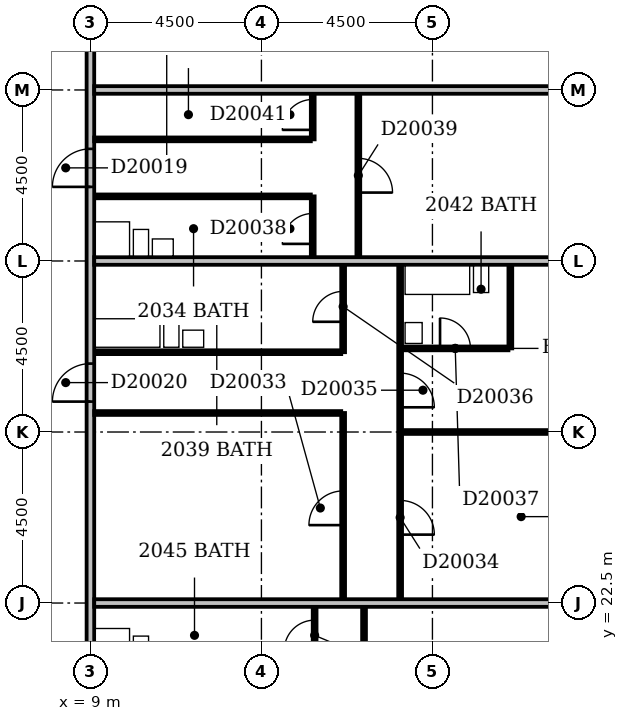
"""IFC4 building model, lengths in metres.
Left out: names, types, materials, properties, quantities, classifications, styles, units other than length and angle.
Written with IfcOpenShell. Run it as: python <this file> out.ifc"""

import sys

from ifc_helpers import new_model, si_unit, direction, frame, frame_2d, origin, place, context, subcontext, project, spatial, rectangle, extrude, element, fill, save


model = new_model("IFC4")
c1 = context("Model", 3, precision=1e-05, world=origin(), true_north=direction((0.0, 1.0)))
c2 = subcontext(c1, "Body", "Model", "MODEL_VIEW")
j1 = project(units=[si_unit("LENGTHUNIT", "METRE"), si_unit("PLANEANGLEUNIT", "RADIAN")], contexts=[c1])
p1 = place(None, origin())
s1 = spatial("IfcSite", under=j1, at=p1, CompositionType="ELEMENT")
p2 = place(p1, origin())
s2 = spatial("IfcBuilding", under=s1, at=p2, CompositionType="ELEMENT")
p3 = place(p2, frame((0.0, 0.0, 83.0)))
s3 = spatial("IfcBuildingStorey", under=s2, at=p3, CompositionType="ELEMENT", Elevation=83.0)
p4 = place(p3, frame((9.0, 5.0, 0.0), z_axis=(0.0, 0.0, 1.0), x_axis=(0.0, 1.0, 0.0)))
e1 = element("IfcWall", 1, at=p4, inside=s3, PredefinedType="PARTITIONING", context=c2, shape_type="SweptSolid", body=[
    extrude(rectangle(XDim=44.5, YDim=0.2, at=frame_2d((22.25, 0.0))), origin(), (0.0, 0.0, 1.0), 3.3),
])
p5 = place(p4, frame((28.45, 0.0, 0.0)))
e2 = element("IfcOpeningElement", 2, at=p5, cuts=e1, PredefinedType="OPENING", context=c2, shape_type="SweptSolid", body=[
    extrude(rectangle(XDim=1.0, YDim=2.1, at=frame_2d((0.5, 1.05))), frame((0.0, 0.112, 0.0), z_axis=(0.0, -1.0, 0.0), x_axis=(1.0, 0.0, 0.0)), (0.0, 0.0, 1.0), 0.224),
])
p6 = place(p4, frame((22.8, 0.0, 0.0)))
e3 = element("IfcOpeningElement", 3, at=p6, cuts=e1, PredefinedType="OPENING", context=c2, shape_type="SweptSolid", body=[
    extrude(rectangle(XDim=1.0, YDim=2.1, at=frame_2d((0.5, 1.05))), frame((0.0, 0.112, 0.0), z_axis=(0.0, -1.0, 0.0), x_axis=(1.0, 0.0, 0.0)), (0.0, 0.0, 1.0), 0.224),
])
p7 = place(p4, frame((14.55, 0.0, 0.0)))
e4 = element("IfcOpeningElement", 4, at=p7, cuts=e1, PredefinedType="OPENING", context=c2, shape_type="SweptSolid", body=[
    extrude(rectangle(XDim=1.0, YDim=2.1, at=frame_2d((0.5, 1.05))), frame((0.0, 0.112, 0.0), z_axis=(0.0, -1.0, 0.0), x_axis=(1.0, 0.0, 0.0)), (0.0, 0.0, 1.0), 0.224),
])
p8 = place(p4, frame((9.3, 0.0, 0.0)))
e5 = element("IfcOpeningElement", 5, at=p8, cuts=e1, PredefinedType="OPENING", context=c2, shape_type="SweptSolid", body=[
    extrude(rectangle(XDim=1.0, YDim=2.1, at=frame_2d((0.5, 1.05))), frame((0.0, 0.112, 0.0), z_axis=(0.0, -1.0, 0.0), x_axis=(1.0, 0.0, 0.0)), (0.0, 0.0, 1.0), 0.224),
])
p9 = place(p4, frame((35.0, 0.0, 0.0)))
e6 = element("IfcOpeningElement", 6, at=p9, cuts=e1, PredefinedType="OPENING", context=c2, shape_type="SweptSolid", body=[
    extrude(rectangle(XDim=0.9, YDim=2.1, at=frame_2d((0.45, 1.05))), frame((0.0, 0.112, 0.0), z_axis=(0.0, -1.0, 0.0), x_axis=(1.0, 0.0, 0.0)), (0.0, 0.0, 1.0), 0.224),
])
p10 = place(p4, frame((1.5, 0.0, 0.0)))
e7 = element("IfcOpeningElement", 7, at=p10, cuts=e1, PredefinedType="OPENING", context=c2, shape_type="SweptSolid", body=[
    extrude(rectangle(XDim=0.9, YDim=2.1, at=frame_2d((0.45, 1.05))), frame((0.0, 0.112, 0.0), z_axis=(0.0, -1.0, 0.0), x_axis=(1.0, 0.0, 0.0)), (0.0, 0.0, 1.0), 0.224),
])
p11 = place(p3, frame((16.2, 18.1, 0.0), z_axis=(0.0, 0.0, 1.0), x_axis=(0.0, 1.0, 0.0)))
e8 = element("IfcWall", 8, at=p11, inside=s3, PredefinedType="PARTITIONING", context=c2, shape_type="SweptSolid", body=[
    extrude(rectangle(XDim=4.3, YDim=0.1, at=frame_2d((2.15, 0.0))), origin(), (0.0, 0.0, 1.0), 3.3),
])
p12 = place(p11, frame((1.7, 0.0, 0.0)))
e9 = element("IfcOpeningElement", 9, at=p12, cuts=e8, PredefinedType="OPENING", context=c2, shape_type="SweptSolid", body=[
    extrude(rectangle(XDim=0.9, YDim=2.1, at=frame_2d((0.45, 1.05))), frame((0.0, 0.062, 0.0), z_axis=(0.0, -1.0, 0.0), x_axis=(1.0, 0.0, 0.0)), (0.0, 0.0, 1.0), 0.124),
])
p13 = place(p3, frame((14.9, 20.8, 0.0), z_axis=(0.0, 0.0, 1.0), x_axis=(0.0, 1.0, 0.0)))
e10 = element("IfcWall", 10, at=p13, inside=s3, PredefinedType="PARTITIONING", context=c2, shape_type="SweptSolid", body=[
    extrude(rectangle(XDim=1.6, YDim=0.1, at=frame_2d((0.8, 0.0))), origin(), (0.0, 0.0, 1.0), 3.3),
])
p14 = place(p13, frame((0.45, 0.0, 0.0)))
e11 = element("IfcOpeningElement", 11, at=p14, cuts=e10, PredefinedType="OPENING", context=c2, shape_type="SweptSolid", body=[
    extrude(rectangle(XDim=0.8, YDim=2.1, at=frame_2d((0.4, 1.05))), frame((0.0, 0.062, 0.0), z_axis=(0.0, -1.0, 0.0), x_axis=(1.0, 0.0, 0.0)), (0.0, 0.0, 1.0), 0.124),
])
p15 = place(p3, frame((9.1, 22.5, 0.0), z_axis=(0.0, 0.0, 1.0), x_axis=(1.0, 0.0, 0.0)))
e12 = element("IfcWall", 12, at=p15, inside=s3, PredefinedType="PARTITIONING", context=c2, shape_type="SweptSolid", body=[
    extrude(rectangle(XDim=12.8, YDim=0.2, at=frame_2d((6.4, 0.0))), origin(), (0.0, 0.0, 1.0), 3.3),
])
p16 = place(p3, frame((15.65, 22.6, 0.0), z_axis=(0.0, 0.0, 1.0), x_axis=(0.0, 1.0, 0.0)))
e13 = element("IfcWall", 13, at=p16, inside=s3, PredefinedType="PARTITIONING", context=c2, shape_type="SweptSolid", body=[
    extrude(rectangle(XDim=4.9, YDim=0.1, at=frame_2d((2.45, 0.0))), origin(), (0.0, 0.0, 1.0), 3.3),
])
p17 = place(p16, frame((1.95, 0.0, 0.0)))
e14 = element("IfcOpeningElement", 14, at=p17, cuts=e13, PredefinedType="OPENING", context=c2, shape_type="SweptSolid", body=[
    extrude(rectangle(XDim=0.9, YDim=2.1, at=frame_2d((0.45, 1.05))), frame((0.0, 0.062, 0.0), z_axis=(0.0, -1.0, 0.0), x_axis=(1.0, 0.0, 0.0)), (0.0, 0.0, 1.0), 0.124),
])
p18 = place(p3, frame((17.15, 22.6, 0.0), z_axis=(0.0, 0.0, 1.0), x_axis=(0.0, 1.0, 0.0)))
e15 = element("IfcWall", 15, at=p18, inside=s3, PredefinedType="PARTITIONING", context=c2, shape_type="SweptSolid", body=[
    extrude(rectangle(XDim=8.8, YDim=0.1, at=frame_2d((4.4, 0.0))), origin(), (0.0, 0.0, 1.0), 3.3),
])
p19 = place(p18, frame((1.7, 0.0, 0.0)))
e16 = element("IfcOpeningElement", 16, at=p19, cuts=e15, PredefinedType="OPENING", context=c2, shape_type="SweptSolid", body=[
    extrude(rectangle(XDim=0.9, YDim=2.1, at=frame_2d((0.45, 1.05))), frame((0.0, 0.062, 0.0), z_axis=(0.0, -1.0, 0.0), x_axis=(1.0, 0.0, 0.0)), (0.0, 0.0, 1.0), 0.124),
])
p20 = place(p18, frame((5.05, 0.0, 0.0)))
e17 = element("IfcOpeningElement", 17, at=p20, cuts=e15, PredefinedType="OPENING", context=c2, shape_type="SweptSolid", body=[
    extrude(rectangle(XDim=0.9, YDim=2.1, at=frame_2d((0.45, 1.05))), frame((0.0, 0.062, 0.0), z_axis=(0.0, -1.0, 0.0), x_axis=(1.0, 0.0, 0.0)), (0.0, 0.0, 1.0), 0.124),
])
p21 = place(p3, frame((17.2, 27.0, 0.0), z_axis=(0.0, 0.0, 1.0), x_axis=(1.0, 0.0, 0.0)))
e18 = element("IfcWall", 18, at=p21, inside=s3, PredefinedType="PARTITIONING", context=c2, shape_type="SweptSolid", body=[
    extrude(rectangle(XDim=4.7, YDim=0.1, at=frame_2d((2.35, 0.0))), origin(), (0.0, 0.0, 1.0), 2.7),
])
p22 = place(p3, frame((9.1, 27.5, 0.0), z_axis=(0.0, 0.0, 1.0), x_axis=(1.0, 0.0, 0.0)))
e19 = element("IfcWall", 19, at=p22, inside=s3, PredefinedType="PARTITIONING", context=c2, shape_type="SweptSolid", body=[
    extrude(rectangle(XDim=6.5, YDim=0.1, at=frame_2d((3.25, 0.0))), origin(), (0.0, 0.0, 1.0), 2.7),
])
p23 = place(p3, frame((9.1, 29.1, 0.0), z_axis=(0.0, 0.0, 1.0), x_axis=(1.0, 0.0, 0.0)))
e20 = element("IfcWall", 20, at=p23, inside=s3, PredefinedType="PLUMBINGWALL", context=c2, shape_type="SweptSolid", body=[
    extrude(rectangle(XDim=6.5, YDim=0.1, at=frame_2d((3.25, 0.0))), origin(), (0.0, 0.0, 1.0), 3.3),
])
p24 = place(p3, frame((15.65, 29.1, 0.0), z_axis=(0.0, 0.0, 1.0), x_axis=(0.0, 1.0, 0.0)))
e21 = element("IfcWall", 21, at=p24, inside=s3, PredefinedType="PARTITIONING", context=c2, shape_type="SweptSolid", body=[
    extrude(rectangle(XDim=2.3, YDim=0.1, at=frame_2d((1.15, 0.0))), origin(), (0.0, 0.0, 1.0), 3.3),
])
p25 = place(p24, frame((0.8, 0.0, 0.0)))
e22 = element("IfcOpeningElement", 22, at=p25, cuts=e21, PredefinedType="OPENING", context=c2, shape_type="SweptSolid", body=[
    extrude(rectangle(XDim=0.8, YDim=2.1, at=frame_2d((0.4, 1.05))), frame((0.0, 0.062, 0.0), z_axis=(0.0, -1.0, 0.0), x_axis=(1.0, 0.0, 0.0)), (0.0, 0.0, 1.0), 0.124),
])
p26 = place(p3, frame((17.2, 29.2, 0.0), z_axis=(0.0, 0.0, 1.0), x_axis=(1.0, 0.0, 0.0)))
e23 = element("IfcWall", 23, at=p26, inside=s3, PredefinedType="PLUMBINGWALL", context=c2, shape_type="SweptSolid", body=[
    extrude(rectangle(XDim=2.8, YDim=0.1, at=frame_2d((1.4, 0.0))), origin(), (0.0, 0.0, 1.0), 3.3),
])
p27 = place(p26, frame((1.0, 0.0, 0.0)))
e24 = element("IfcOpeningElement", 24, at=p27, cuts=e23, PredefinedType="OPENING", context=c2, shape_type="SweptSolid", body=[
    extrude(rectangle(XDim=0.8, YDim=2.1, at=frame_2d((0.4, 1.05))), frame((0.0, 0.062, 0.0), z_axis=(0.0, -1.0, 0.0), x_axis=(1.0, 0.0, 0.0)), (0.0, 0.0, 1.0), 0.124),
])
p28 = place(p3, frame((20.05, 29.2, 0.0), z_axis=(0.0, 0.0, 1.0), x_axis=(0.0, 1.0, 0.0)))
e25 = element("IfcWall", 25, at=p28, inside=s3, PredefinedType="PLUMBINGWALL", context=c2, shape_type="SweptSolid", body=[
    extrude(rectangle(XDim=2.2, YDim=0.1, at=frame_2d((1.1, 0.0))), origin(), (0.0, 0.0, 1.0), 3.3),
])
p29 = place(p3, frame((9.1, 31.5, 0.0), z_axis=(0.0, 0.0, 1.0), x_axis=(1.0, 0.0, 0.0)))
e26 = element("IfcWall", 26, at=p29, inside=s3, PredefinedType="PARTITIONING", context=c2, shape_type="SweptSolid", body=[
    extrude(rectangle(XDim=12.8, YDim=0.2, at=frame_2d((6.4, 0.0))), origin(), (0.0, 0.0, 1.0), 3.3),
])
p30 = place(p3, frame((14.85, 31.6, 0.0), z_axis=(0.0, 0.0, 1.0), x_axis=(0.0, 1.0, 0.0)))
e27 = element("IfcWall", 27, at=p30, inside=s3, PredefinedType="PARTITIONING", context=c2, shape_type="SweptSolid", body=[
    extrude(rectangle(XDim=1.6, YDim=0.1, at=frame_2d((0.8, 0.0))), origin(), (0.0, 0.0, 1.0), 3.3),
])
p31 = place(p30, frame((0.35, 0.0, 0.0)))
e28 = element("IfcOpeningElement", 28, at=p31, cuts=e27, PredefinedType="OPENING", context=c2, shape_type="SweptSolid", body=[
    extrude(rectangle(XDim=0.8, YDim=2.1, at=frame_2d((0.4, 1.05))), frame((0.0, 0.062, 0.0), z_axis=(0.0, -1.0, 0.0), x_axis=(1.0, 0.0, 0.0)), (0.0, 0.0, 1.0), 0.124),
])
p32 = place(p3, frame((16.05, 31.6, 0.0), z_axis=(0.0, 0.0, 1.0), x_axis=(0.0, 1.0, 0.0)))
e29 = element("IfcWall", 29, at=p32, inside=s3, PredefinedType="PARTITIONING", context=c2, shape_type="SweptSolid", body=[
    extrude(rectangle(XDim=4.3, YDim=0.1, at=frame_2d((2.15, 0.0))), origin(), (0.0, 0.0, 1.0), 3.3),
])
p33 = place(p32, frame((1.7, 0.0, 0.0)))
e30 = element("IfcOpeningElement", 30, at=p33, cuts=e29, PredefinedType="OPENING", context=c2, shape_type="SweptSolid", body=[
    extrude(rectangle(XDim=0.9, YDim=2.1, at=frame_2d((0.45, 1.05))), frame((0.0, 0.062, 0.0), z_axis=(0.0, -1.0, 0.0), x_axis=(1.0, 0.0, 0.0)), (0.0, 0.0, 1.0), 0.124),
])
p34 = place(p3, frame((9.1, 33.2, 0.0), z_axis=(0.0, 0.0, 1.0), x_axis=(1.0, 0.0, 0.0)))
e31 = element("IfcWall", 31, at=p34, inside=s3, PredefinedType="PLUMBINGWALL", context=c2, shape_type="SweptSolid", body=[
    extrude(rectangle(XDim=5.7, YDim=0.1, at=frame_2d((2.85, 0.0))), origin(), (0.0, 0.0, 1.0), 3.3),
])
p35 = place(p3, frame((9.1, 34.7, 0.0), z_axis=(0.0, 0.0, 1.0), x_axis=(1.0, 0.0, 0.0)))
e32 = element("IfcWall", 32, at=p35, inside=s3, PredefinedType="PARTITIONING", context=c2, shape_type="SweptSolid", body=[
    extrude(rectangle(XDim=5.7, YDim=0.1, at=frame_2d((2.85, 0.0))), origin(), (0.0, 0.0, 1.0), 3.3),
])
p36 = place(p3, frame((14.85, 34.7, 0.0), z_axis=(0.0, 0.0, 1.0), x_axis=(0.0, 1.0, 0.0)))
e33 = element("IfcWall", 33, at=p36, inside=s3, PredefinedType="PARTITIONING", context=c2, shape_type="SweptSolid", body=[
    extrude(rectangle(XDim=1.2, YDim=0.1, at=frame_2d((0.6, 0.0))), origin(), (0.0, 0.0, 1.0), 3.3),
])
p37 = place(p36, frame((0.25, 0.0, 0.0)))
e34 = element("IfcOpeningElement", 34, at=p37, cuts=e33, PredefinedType="OPENING", context=c2, shape_type="SweptSolid", body=[
    extrude(rectangle(XDim=0.8, YDim=2.1, at=frame_2d((0.4, 1.05))), frame((0.0, 0.062, 0.0), z_axis=(0.0, -1.0, 0.0), x_axis=(1.0, 0.0, 0.0)), (0.0, 0.0, 1.0), 0.124),
])
p38 = place(p3, frame((9.1, 36.0, 0.0), z_axis=(0.0, 0.0, 1.0), x_axis=(1.0, 0.0, 0.0)))
e35 = element("IfcWall", 35, at=p38, inside=s3, PredefinedType="PARTITIONING", context=c2, shape_type="SweptSolid", body=[
    extrude(rectangle(XDim=12.8, YDim=0.2, at=frame_2d((6.4, 0.0))), origin(), (0.0, 0.0, 1.0), 2.4),
])
p39 = place(p5, origin())
e36 = element("IfcDoor", 36, at=p39, inside=s3, OperationType="SINGLE_SWING_LEFT", PredefinedType="DOOR", context=c2, shape_type="SweptSolid", body=[
    extrude(rectangle(XDim=1.0, YDim=2.1, at=frame_2d((0.5, 1.05))), frame((0.0, 0.025, 0.0), z_axis=(0.0, -1.0, 0.0), x_axis=(1.0, 0.0, 0.0)), (0.0, 0.0, 1.0), 0.05),
])
fill(e2, e36)
p40 = place(p6, origin())
e37 = element("IfcDoor", 37, at=p40, inside=s3, OperationType="SINGLE_SWING_LEFT", PredefinedType="DOOR", context=c2, shape_type="SweptSolid", body=[
    extrude(rectangle(XDim=1.0, YDim=2.1, at=frame_2d((0.5, 1.05))), frame((0.0, 0.025, 0.0), z_axis=(0.0, -1.0, 0.0), x_axis=(1.0, 0.0, 0.0)), (0.0, 0.0, 1.0), 0.05),
])
fill(e3, e37)
p41 = place(p14, origin())
e38 = element("IfcDoor", 38, at=p41, inside=s3, OperationType="SINGLE_SWING_LEFT", PredefinedType="DOOR", context=c2, shape_type="SweptSolid", body=[
    extrude(rectangle(XDim=0.8, YDim=2.1, at=frame_2d((0.4, 1.05))), frame((0.0, 0.025, 0.0), z_axis=(0.0, -1.0, 0.0), x_axis=(1.0, 0.0, 0.0)), (0.0, 0.0, 1.0), 0.05),
])
fill(e11, e38)
p42 = place(p17, origin())
e39 = element("IfcDoor", 39, at=p42, inside=s3, OperationType="SINGLE_SWING_LEFT", PredefinedType="DOOR", context=c2, shape_type="SweptSolid", body=[
    extrude(rectangle(XDim=0.9, YDim=2.1, at=frame_2d((0.45, 1.05))), frame((0.0, 0.025, 0.0), z_axis=(0.0, -1.0, 0.0), x_axis=(1.0, 0.0, 0.0)), (0.0, 0.0, 1.0), 0.05),
])
fill(e14, e39)
p43 = place(p19, frame((0.9, 0.0, 0.0), z_axis=(0.0, 0.0, 1.0), x_axis=(-1.0, 0.0, 0.0)))
e40 = element("IfcDoor", 40, at=p43, inside=s3, OperationType="SINGLE_SWING_RIGHT", PredefinedType="DOOR", context=c2, shape_type="SweptSolid", body=[
    extrude(rectangle(XDim=0.9, YDim=2.1, at=frame_2d((0.45, 1.05))), frame((0.0, 0.025, 0.0), z_axis=(0.0, -1.0, 0.0), x_axis=(1.0, 0.0, 0.0)), (0.0, 0.0, 1.0), 0.05),
])
fill(e16, e40)
p44 = place(p20, frame((0.9, 0.0, 0.0), z_axis=(0.0, 0.0, 1.0), x_axis=(-1.0, 0.0, 0.0)))
e41 = element("IfcDoor", 41, at=p44, inside=s3, OperationType="SINGLE_SWING_RIGHT", PredefinedType="DOOR", context=c2, shape_type="SweptSolid", body=[
    extrude(rectangle(XDim=0.9, YDim=2.1, at=frame_2d((0.45, 1.05))), frame((0.0, 0.025, 0.0), z_axis=(0.0, -1.0, 0.0), x_axis=(1.0, 0.0, 0.0)), (0.0, 0.0, 1.0), 0.05),
])
fill(e17, e41)
p45 = place(p25, origin())
e42 = element("IfcDoor", 42, at=p45, inside=s3, OperationType="SINGLE_SWING_LEFT", PredefinedType="DOOR", context=c2, shape_type="SweptSolid", body=[
    extrude(rectangle(XDim=0.8, YDim=2.1, at=frame_2d((0.4, 1.05))), frame((0.0, 0.025, 0.0), z_axis=(0.0, -1.0, 0.0), x_axis=(1.0, 0.0, 0.0)), (0.0, 0.0, 1.0), 0.05),
])
fill(e22, e42)
p46 = place(p27, origin())
e43 = element("IfcDoor", 43, at=p46, inside=s3, OperationType="SINGLE_SWING_LEFT", PredefinedType="DOOR", context=c2, shape_type="SweptSolid", body=[
    extrude(rectangle(XDim=0.8, YDim=2.1, at=frame_2d((0.4, 1.05))), frame((0.0, 0.025, 0.0), z_axis=(0.0, -1.0, 0.0), x_axis=(1.0, 0.0, 0.0)), (0.0, 0.0, 1.0), 0.05),
])
fill(e24, e43)
p47 = place(p31, origin())
e44 = element("IfcDoor", 44, at=p47, inside=s3, OperationType="SINGLE_SWING_LEFT", PredefinedType="DOOR", context=c2, shape_type="SweptSolid", body=[
    extrude(rectangle(XDim=0.8, YDim=2.1, at=frame_2d((0.4, 1.05))), frame((0.0, 0.025, 0.0), z_axis=(0.0, -1.0, 0.0), x_axis=(1.0, 0.0, 0.0)), (0.0, 0.0, 1.0), 0.05),
])
fill(e28, e44)
p48 = place(p33, frame((0.9, 0.0, 0.0), z_axis=(0.0, 0.0, 1.0), x_axis=(-1.0, 0.0, 0.0)))
e45 = element("IfcDoor", 45, at=p48, inside=s3, OperationType="SINGLE_SWING_RIGHT", PredefinedType="DOOR", context=c2, shape_type="SweptSolid", body=[
    extrude(rectangle(XDim=0.9, YDim=2.1, at=frame_2d((0.45, 1.05))), frame((0.0, 0.025, 0.0), z_axis=(0.0, -1.0, 0.0), x_axis=(1.0, 0.0, 0.0)), (0.0, 0.0, 1.0), 0.05),
])
fill(e30, e45)
p49 = place(p37, origin())
e46 = element("IfcDoor", 46, at=p49, inside=s3, OperationType="SINGLE_SWING_LEFT", PredefinedType="DOOR", context=c2, shape_type="SweptSolid", body=[
    extrude(rectangle(XDim=0.8, YDim=2.1, at=frame_2d((0.4, 1.05))), frame((0.0, 0.025, 0.0), z_axis=(0.0, -1.0, 0.0), x_axis=(1.0, 0.0, 0.0)), (0.0, 0.0, 1.0), 0.05),
])
fill(e34, e46)
save(model, sys.argv[1])
